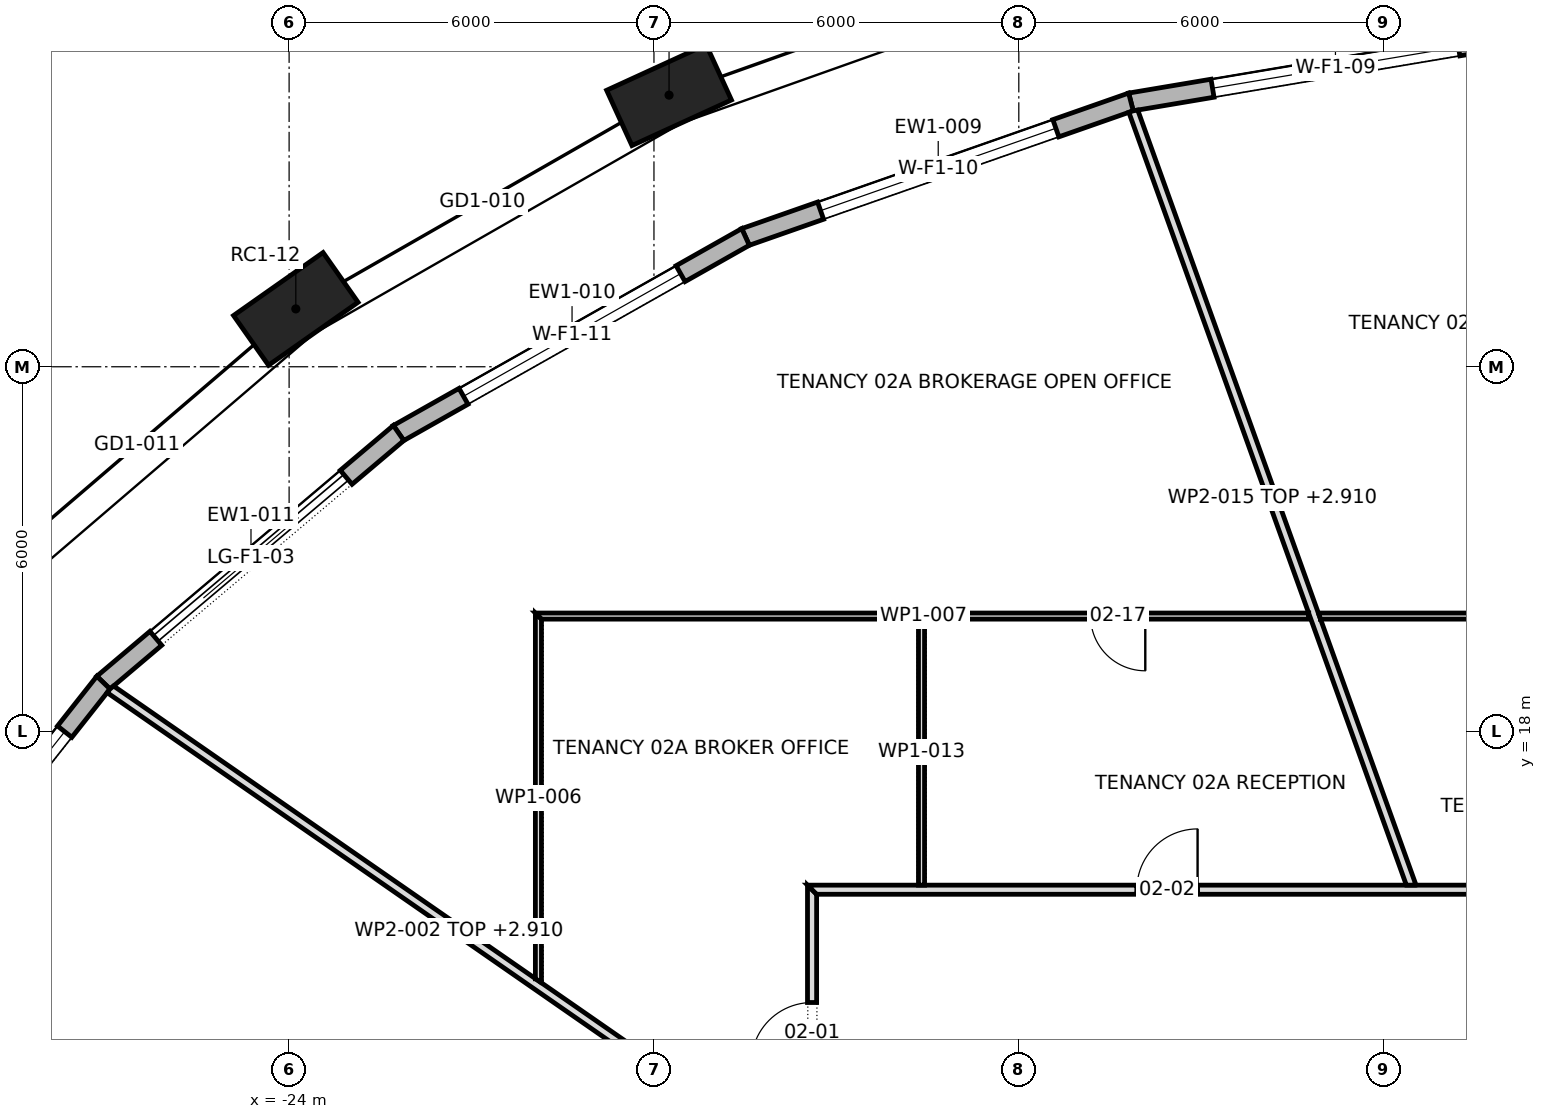
"""IFC4 building model, lengths in metres.
Left out: names, types, materials, properties, quantities, classifications, styles, units other than length and angle.
Written with IfcOpenShell. Run it as: python <this file> out.ifc"""

import sys

from ifc_helpers import new_model, si_unit, direction, frame, frame_2d, origin, origin_2d, place, context, subcontext, project, spatial, polyline, rectangle, outline, extrude, element, fill, save


model = new_model("IFC4")
c1 = context("Model", 3, precision=1e-05, world=origin(), true_north=direction((0.0, 1.0)))
c2 = subcontext(c1, "Body", "Model", "MODEL_VIEW")
j1 = project(units=[si_unit("LENGTHUNIT", "METRE"), si_unit("PLANEANGLEUNIT", "RADIAN")], contexts=[c1])
p1 = place(None, origin())
s1 = spatial("IfcSite", under=j1, at=p1, CompositionType="ELEMENT")
p2 = place(p1, origin())
s2 = spatial("IfcBuilding", under=s1, at=p2, CompositionType="ELEMENT")
p3 = place(p2, frame((0.0, 0.0, 36.1)))
s3 = spatial("IfcBuildingStorey", under=s2, at=p3, CompositionType="ELEMENT", Elevation=36.1)
for number, where, z_axis, x_axis in (
    (1, (-17.752, 28.467, 0.0), (0.0, 0.0, 1.0), (-0.909, -0.417, 0.0)),
    (2, (-23.89, 24.951, 0.0), (0.0, 0.0, 1.0), (-0.818, -0.575, 0.0)),
):
    element("IfcColumn", number, at=place(p3, frame(where, z_axis=z_axis, x_axis=x_axis)), inside=s3, PredefinedType="COLUMN", context=c2, shape_type="SweptSolid", body=[
        extrude(rectangle(XDim=1.8, YDim=1.0, at=origin_2d()), origin(), (0.0, 0.0, 1.0), 4.2),
    ])
p4 = place(p3, frame((-3.429, 29.486, 0.0), z_axis=(0.0, 0.0, 1.0), x_axis=(-0.986145179906, -0.165884550659, 0.0)))
e3 = element("IfcWall", 3, at=p4, inside=s3, PredefinedType="STANDARD", context=c2, shape_type="SweptSolid", body=[
    extrude(outline(polyline([(-0.012, -0.15), (6.834, -0.15), (6.809, 0.15), (0.012, 0.15), (-0.012, -0.15)])), origin(), (0.0, 0.0, 1.0), 3.9),
])
p5 = place(p4, frame((1.361, 0.0, 0.6)))
e4 = element("IfcOpeningElement", 4, at=p5, cuts=e3, PredefinedType="OPENING", context=c2, shape_type="SweptSolid", body=[
    extrude(rectangle(XDim=4.1, YDim=2.85, at=frame_2d((2.05, 1.425))), frame((0.0, 0.162, 0.0), z_axis=(0.0, -1.0, 0.0), x_axis=(1.0, 0.0, 0.0)), (0.0, 0.0, 1.0), 0.324),
])
p6 = place(p3, frame((-10.156, 28.355, 0.0), z_axis=(0.0, 0.0, 1.0), x_axis=(-0.943778979427, -0.330577128657, 0.0)))
e5 = element("IfcWall", 5, at=p6, inside=s3, PredefinedType="STANDARD", context=c2, shape_type="SweptSolid", body=[
    extrude(outline(polyline([(-0.013, -0.15), (6.729, -0.15), (6.702, 0.15), (0.013, 0.15), (-0.013, -0.15)])), origin(), (0.0, 0.0, 1.0), 3.9),
])
p7 = place(p6, frame((1.308, 0.0, 0.6)))
e6 = element("IfcOpeningElement", 6, at=p7, cuts=e5, PredefinedType="OPENING", context=c2, shape_type="SweptSolid", body=[
    extrude(rectangle(XDim=4.1, YDim=2.85, at=frame_2d((2.05, 1.425))), frame((0.0, 0.162, 0.0), z_axis=(0.0, -1.0, 0.0), x_axis=(1.0, 0.0, 0.0)), (0.0, 0.0, 1.0), 0.324),
])
p8 = place(p3, frame((-16.494, 26.135, 0.0), z_axis=(0.0, 0.0, 1.0), x_axis=(-0.87061279013, -0.491968870623, 0.0)))
e7 = element("IfcWall", 7, at=p8, inside=s3, PredefinedType="STANDARD", context=c2, shape_type="SweptSolid", body=[
    extrude(outline(polyline([(-0.013, -0.15), (6.568, -0.15), (6.539, 0.15), (0.013, 0.15), (-0.013, -0.15)])), origin(), (0.0, 0.0, 1.0), 3.9),
])
p9 = place(p8, frame((1.227, 0.0, 0.6)))
e8 = element("IfcOpeningElement", 8, at=p9, cuts=e7, PredefinedType="OPENING", context=c2, shape_type="SweptSolid", body=[
    extrude(rectangle(XDim=4.1, YDim=2.85, at=frame_2d((2.05, 1.425))), frame((0.0, 0.162, 0.0), z_axis=(0.0, -1.0, 0.0), x_axis=(1.0, 0.0, 0.0)), (0.0, 0.0, 1.0), 0.324),
])
p10 = place(p3, frame((-22.2, 22.911, 0.0), z_axis=(0.0, 0.0, 1.0), x_axis=(-0.763577077796, -0.645716691951, 0.0)))
e9 = element("IfcWall", 9, at=p10, inside=s3, PredefinedType="STANDARD", context=c2, shape_type="SweptSolid", body=[
    extrude(outline(polyline([(-0.014, -0.15), (6.372, -0.15), (6.342, 0.15), (0.014, 0.15), (-0.014, -0.15)])), origin(), (0.0, 0.0, 1.0), 3.9),
])
p11 = place(p10, frame((1.129, 0.0, 0.0)))
e10 = element("IfcOpeningElement", 10, at=p11, cuts=e9, PredefinedType="OPENING", context=c2, shape_type="SweptSolid", body=[
    extrude(rectangle(XDim=4.1, YDim=3.45, at=frame_2d((2.05, 1.725))), frame((0.0, 0.162, 0.0), z_axis=(0.0, -1.0, 0.0), x_axis=(1.0, 0.0, 0.0)), (0.0, 0.0, 1.0), 0.324),
])
p12 = place(p3, frame((-27.054, 18.806, 0.0), z_axis=(0.0, 0.0, 1.0), x_axis=(-0.61992334328, -0.784662378642, 0.0)))
e11 = element("IfcWall", 11, at=p12, inside=s3, PredefinedType="STANDARD", context=c2, shape_type="SweptSolid", body=[
    extrude(outline(polyline([(-0.015, -0.15), (6.171, -0.15), (6.139, 0.15), (0.015, 0.15), (-0.015, -0.15)])), origin(), (0.0, 0.0, 1.0), 3.9),
])
p13 = place(p12, frame((1.027, 0.0, 0.6)))
e12 = element("IfcOpeningElement", 12, at=p13, cuts=e11, PredefinedType="OPENING", context=c2, shape_type="SweptSolid", body=[
    extrude(rectangle(XDim=4.1, YDim=2.85, at=frame_2d((2.05, 1.425))), frame((0.0, 0.162, 0.0), z_axis=(0.0, -1.0, 0.0), x_axis=(1.0, 0.0, 0.0)), (0.0, 0.0, 1.0), 0.324),
])
p14 = place(p3, frame((-26.949, 18.703, 0.0), z_axis=(0.0, 0.0, 1.0), x_axis=(0.821614916445, -0.570042918626, 0.0)))
e13 = element("IfcWall", 13, at=p14, inside=s3, PredefinedType="PARTITIONING", context=c2, shape_type="SweptSolid", body=[
    extrude(outline(polyline([(14.017, -0.075), (14.017, -0.074), (13.967, -0.002), (13.967, -0.002), (13.914, 0.075), (12.1, 0.075), (10.286, 0.075), (8.472, 0.075), (8.469, 0.073), (8.467, 0.075), (6.779, 0.075), (5.09, 0.075), (3.402, 0.075), (1.713, 0.075), (0.024, 0.075), (0.004, 0.0), (0.0, -0.071), (0.0, -0.075), (1.752, -0.075), (3.504, -0.075), (5.257, -0.075), (7.009, -0.075), (8.761, -0.075), (10.513, -0.075), (12.265, -0.075), (14.017, -0.075)])), origin(), (0.0, 0.0, 1.0), 2.91),
])
p15 = place(p3, frame((-19.9, 13.869, 0.0), z_axis=(0.0, 0.0, 1.0), x_axis=(0.0, 1.0, 0.0)))
e14 = element("IfcWall", 14, at=p15, inside=s3, PredefinedType="PARTITIONING", context=c2, shape_type="SweptSolid", body=[
    extrude(outline(polyline([(0.0, -0.05), (1.994, -0.05), (3.987, -0.05), (5.981, -0.05), (5.981, -0.05), (6.081, 0.05), (4.578, 0.05), (3.075, 0.05), (1.572, 0.05), (0.069, 0.05), (0.0, -0.05), (0.0, -0.05)])), origin(), (0.0, 0.0, 1.0), 3.9),
])
p16 = place(p3, frame((-19.95, 19.9, 0.0), z_axis=(0.0, 0.0, 1.0), x_axis=(1.0, 0.0, 0.0)))
e15 = element("IfcWall", 15, at=p16, inside=s3, PredefinedType="PARTITIONING", context=c2, shape_type="SweptSolid", body=[
    extrude(outline(polyline([(12.718, 0.05), (10.901, 0.05), (9.084, 0.05), (7.267, 0.05), (5.45, 0.05), (3.634, 0.05), (1.817, 0.05), (0.0, 0.05), (0.1, -0.05), (1.903, -0.05), (3.705, -0.05), (5.508, -0.05), (7.31, -0.05), (9.113, -0.05), (10.915, -0.05), (12.718, -0.05), (12.718, 0.05)])), origin(), (0.0, 0.0, 1.0), 3.9),
])
p17 = place(p16, frame((9.13, 0.0, 0.0)))
e16 = element("IfcOpeningElement", 16, at=p17, cuts=e15, PredefinedType="OPENING", context=c2, shape_type="SweptSolid", body=[
    extrude(rectangle(XDim=0.9, YDim=2.1, at=frame_2d((0.45, 1.05))), frame((0.0, 0.062, 0.0), z_axis=(0.0, -1.0, 0.0), x_axis=(1.0, 0.0, 0.0)), (0.0, 0.0, 1.0), 0.124),
])
p18 = place(p3, frame((-15.4, -15.475, 0.0), z_axis=(0.0, 0.0, 1.0), x_axis=(0.0, 1.0, 0.0)))
e17 = element("IfcWall", 17, at=p18, inside=s3, PredefinedType="PARTITIONING", context=c2, shape_type="SweptSolid", body=[
    extrude(outline(polyline([(0.15, -0.075), (2.066, -0.075), (3.981, -0.075), (5.897, -0.075), (7.812, -0.075), (9.728, -0.075), (11.644, -0.075), (13.56, -0.075), (15.475, -0.075), (17.391, -0.075), (19.306, -0.075), (21.222, -0.075), (23.138, -0.075), (25.053, -0.075), (26.969, -0.075), (28.885, -0.075), (30.8, -0.075), (30.95, 0.075), (29.016, 0.075), (27.081, 0.075), (25.147, 0.075), (23.212, 0.075), (21.278, 0.075), (19.344, 0.075), (17.409, 0.075), (15.475, 0.075), (13.541, 0.075), (11.606, 0.075), (9.672, 0.075), (7.738, 0.075), (5.803, 0.075), (3.869, 0.075), (1.935, 0.075), (0.0, 0.075), (0.15, -0.075)])), origin(), (0.0, 0.0, 1.0), 3.9),
])
p19 = place(p18, frame((28.02, 0.0, 0.0)))
e18 = element("IfcOpeningElement", 18, at=p19, cuts=e17, PredefinedType="OPENING", context=c2, shape_type="SweptSolid", body=[
    extrude(rectangle(XDim=1.0, YDim=2.1, at=frame_2d((0.5, 1.05))), frame((0.0, 0.087, 0.0), z_axis=(0.0, -1.0, 0.0), x_axis=(1.0, 0.0, 0.0)), (0.0, 0.0, 1.0), 0.174),
])
p20 = place(p18, frame((21.895, 0.0, 0.0)))
e19 = element("IfcOpeningElement", 19, at=p20, cuts=e17, PredefinedType="OPENING", context=c2, shape_type="SweptSolid", body=[
    extrude(rectangle(XDim=1.8, YDim=2.1, at=frame_2d((0.9, 1.05))), frame((0.0, 0.087, 0.0), z_axis=(0.0, -1.0, 0.0), x_axis=(1.0, 0.0, 0.0)), (0.0, 0.0, 1.0), 0.174),
])
p21 = place(p18, frame((15.798, 0.0, 0.0)))
e20 = element("IfcOpeningElement", 20, at=p21, cuts=e17, PredefinedType="OPENING", context=c2, shape_type="SweptSolid", body=[
    extrude(rectangle(XDim=1.8, YDim=2.1, at=frame_2d((0.9, 1.05))), frame((0.0, 0.087, 0.0), z_axis=(0.0, -1.0, 0.0), x_axis=(1.0, 0.0, 0.0)), (0.0, 0.0, 1.0), 0.174),
])
p22 = place(p18, frame((10.343, 0.0, 0.0)))
e21 = element("IfcOpeningElement", 21, at=p22, cuts=e17, PredefinedType="OPENING", context=c2, shape_type="SweptSolid", body=[
    extrude(rectangle(XDim=1.8, YDim=2.1, at=frame_2d((0.9, 1.05))), frame((0.0, 0.087, 0.0), z_axis=(0.0, -1.0, 0.0), x_axis=(1.0, 0.0, 0.0)), (0.0, 0.0, 1.0), 0.174),
])
p23 = place(p18, frame((3.795, 0.0, 0.0)))
e22 = element("IfcOpeningElement", 22, at=p23, cuts=e17, PredefinedType="OPENING", context=c2, shape_type="SweptSolid", body=[
    extrude(rectangle(XDim=1.0, YDim=2.1, at=frame_2d((0.5, 1.05))), frame((0.0, 0.087, 0.0), z_axis=(0.0, -1.0, 0.0), x_axis=(1.0, 0.0, 0.0)), (0.0, 0.0, 1.0), 0.174),
])
p24 = place(p3, frame((-15.475, 15.4, 0.0), z_axis=(0.0, 0.0, 1.0), x_axis=(1.0, 0.0, 0.0)))
e23 = element("IfcWall", 23, at=p24, inside=s3, PredefinedType="PARTITIONING", context=c2, shape_type="SweptSolid", body=[
    extrude(outline(polyline([(0.15, -0.075), (2.066, -0.075), (3.981, -0.075), (5.897, -0.075), (7.812, -0.075), (9.728, -0.075), (11.644, -0.075), (13.56, -0.075), (15.475, -0.075), (17.391, -0.075), (19.306, -0.075), (21.222, -0.075), (23.138, -0.075), (25.053, -0.075), (26.969, -0.075), (28.885, -0.075), (30.8, -0.075), (30.95, 0.075), (29.016, 0.075), (27.081, 0.075), (25.147, 0.075), (23.212, 0.075), (21.278, 0.075), (19.344, 0.075), (17.409, 0.075), (15.475, 0.075), (13.541, 0.075), (11.606, 0.075), (9.672, 0.075), (7.738, 0.075), (5.803, 0.075), (3.869, 0.075), (1.935, 0.075), (0.0, 0.075), (0.15, -0.075)])), origin(), (0.0, 0.0, 1.0), 3.9),
])
p25 = place(p24, frame((5.415, 0.0, 0.0)))
e24 = element("IfcOpeningElement", 24, at=p25, cuts=e23, PredefinedType="OPENING", context=c2, shape_type="SweptSolid", body=[
    extrude(rectangle(XDim=1.0, YDim=2.1, at=frame_2d((0.5, 1.05))), frame((0.0, 0.087, 0.0), z_axis=(0.0, -1.0, 0.0), x_axis=(1.0, 0.0, 0.0)), (0.0, 0.0, 1.0), 0.174),
])
p26 = place(p24, frame((25.435, 0.0, 0.0)))
e25 = element("IfcOpeningElement", 25, at=p26, cuts=e23, PredefinedType="OPENING", context=c2, shape_type="SweptSolid", body=[
    extrude(rectangle(XDim=1.0, YDim=2.1, at=frame_2d((0.5, 1.05))), frame((0.0, 0.087, 0.0), z_axis=(0.0, -1.0, 0.0), x_axis=(1.0, 0.0, 0.0)), (0.0, 0.0, 1.0), 0.174),
])
p27 = place(p24, frame((14.975, 0.0, 0.0)))
e26 = element("IfcOpeningElement", 26, at=p27, cuts=e23, PredefinedType="OPENING", context=c2, shape_type="SweptSolid", body=[
    extrude(rectangle(XDim=1.0, YDim=2.1, at=frame_2d((0.5, 1.05))), frame((0.0, 0.087, 0.0), z_axis=(0.0, -1.0, 0.0), x_axis=(1.0, 0.0, 0.0)), (0.0, 0.0, 1.0), 0.174),
])
p28 = place(p3, frame((-13.6, 19.85, 0.0), z_axis=(0.0, 0.0, 1.0), x_axis=(0.0, -1.0, 0.0)))
e27 = element("IfcWall", 27, at=p28, inside=s3, PredefinedType="PARTITIONING", context=c2, shape_type="SweptSolid", body=[
    extrude(rectangle(XDim=4.375, YDim=0.1, at=frame_2d((2.188, 0.0))), origin(), (0.0, 0.0, 1.0), 3.9),
])
p29 = place(p3, frame((-10.119, 28.209, 0.0), z_axis=(0.0, 0.0, 1.0), x_axis=(0.337949016046, -0.941164418448, 0.0)))
e28 = element("IfcWall", 28, at=p29, inside=s3, PredefinedType="PARTITIONING", context=c2, shape_type="SweptSolid", body=[
    extrude(outline(polyline([(0.0, -0.075), (1.75, -0.075), (3.5, -0.075), (5.249, -0.075), (6.999, -0.075), (8.749, -0.075), (8.749, -0.074), (8.751, -0.075), (10.335, -0.075), (11.919, -0.075), (13.503, -0.075), (13.555, 0.069), (13.555, 0.069), (13.557, 0.074), (13.557, 0.075), (12.008, 0.075), (10.458, 0.075), (8.909, 0.075), (8.908, 0.073), (8.903, 0.075), (7.125, 0.075), (5.347, 0.075), (3.57, 0.075), (1.792, 0.075), (0.014, 0.075), (0.0, 0.0), (0.0, -0.071), (0.0, -0.075)])), origin(), (0.0, 0.0, 1.0), 2.91),
])
p30 = place(p3, frame((-7.074, 19.9, 0.0), z_axis=(0.0, 0.0, 1.0), x_axis=(1.0, 0.0, 0.0)))
e29 = element("IfcWall", 29, at=p30, inside=s3, PredefinedType="PARTITIONING", context=c2, shape_type="SweptSolid", body=[
    extrude(outline(polyline([(0.036, -0.05), (1.795, -0.05), (3.555, -0.05), (5.314, -0.05), (7.074, -0.05), (8.833, -0.05), (10.593, -0.05), (12.353, -0.05), (14.112, -0.05), (14.148, 0.05), (14.148, 0.05), (12.379, 0.05), (10.611, 0.05), (8.843, 0.05), (7.074, 0.05), (5.305, 0.05), (3.537, 0.05), (1.769, 0.05), (0.0, 0.05), (0.0, 0.05), (0.036, -0.05)])), origin(), (0.0, 0.0, 1.0), 3.9),
])
p31 = place(p30, frame((6.624, 0.0, 0.0)))
e30 = element("IfcOpeningElement", 30, at=p31, cuts=e29, PredefinedType="OPENING", context=c2, shape_type="SweptSolid", body=[
    extrude(rectangle(XDim=0.9, YDim=2.1, at=frame_2d((0.45, 1.05))), frame((0.0, 0.062, 0.0), z_axis=(0.0, -1.0, 0.0), x_axis=(1.0, 0.0, 0.0)), (0.0, 0.0, 1.0), 0.124),
])
p32 = place(p5, origin())
e31 = element("IfcWindow", 31, at=p32, inside=s3, PartitioningType="TRIPLE_PANEL_VERTICAL", PredefinedType="WINDOW", context=c2, shape_type="SweptSolid", body=[
    extrude(rectangle(XDim=4.1, YDim=2.85, at=frame_2d((2.05, 1.425))), frame((0.0, 0.03, 0.0), z_axis=(0.0, -1.0, 0.0), x_axis=(1.0, 0.0, 0.0)), (0.0, 0.0, 1.0), 0.06),
])
fill(e4, e31)
p33 = place(p7, origin())
e32 = element("IfcWindow", 32, at=p33, inside=s3, PartitioningType="TRIPLE_PANEL_VERTICAL", PredefinedType="WINDOW", context=c2, shape_type="SweptSolid", body=[
    extrude(rectangle(XDim=4.1, YDim=2.85, at=frame_2d((2.05, 1.425))), frame((0.0, 0.03, 0.0), z_axis=(0.0, -1.0, 0.0), x_axis=(1.0, 0.0, 0.0)), (0.0, 0.0, 1.0), 0.06),
])
fill(e6, e32)
p34 = place(p9, origin())
e33 = element("IfcWindow", 33, at=p34, inside=s3, PartitioningType="TRIPLE_PANEL_VERTICAL", PredefinedType="WINDOW", context=c2, shape_type="SweptSolid", body=[
    extrude(rectangle(XDim=4.1, YDim=2.85, at=frame_2d((2.05, 1.425))), frame((0.0, 0.03, 0.0), z_axis=(0.0, -1.0, 0.0), x_axis=(1.0, 0.0, 0.0)), (0.0, 0.0, 1.0), 0.06),
])
fill(e8, e33)
p35 = place(p11, origin())
e34 = element("IfcDoor", 34, at=p35, inside=s3, OperationType="DOUBLE_DOOR_SLIDING", PredefinedType="DOOR", context=c2, shape_type="SweptSolid", body=[
    extrude(rectangle(XDim=4.1, YDim=3.45, at=frame_2d((2.05, 1.725))), frame((0.0, 0.025, 0.0), z_axis=(0.0, -1.0, 0.0), x_axis=(1.0, 0.0, 0.0)), (0.0, 0.0, 1.0), 0.05),
])
fill(e10, e34)
p36 = place(p13, origin())
e35 = element("IfcWindow", 35, at=p36, inside=s3, PartitioningType="TRIPLE_PANEL_VERTICAL", PredefinedType="WINDOW", context=c2, shape_type="SweptSolid", body=[
    extrude(rectangle(XDim=4.1, YDim=2.85, at=frame_2d((2.05, 1.425))), frame((0.0, 0.03, 0.0), z_axis=(0.0, -1.0, 0.0), x_axis=(1.0, 0.0, 0.0)), (0.0, 0.0, 1.0), 0.06),
])
fill(e12, e35)
p37 = place(p19, origin())
e36 = element("IfcDoor", 36, at=p37, inside=s3, OperationType="SINGLE_SWING_RIGHT", PredefinedType="DOOR", context=c2, shape_type="SweptSolid", body=[
    extrude(rectangle(XDim=1.0, YDim=2.1, at=frame_2d((0.5, 1.05))), frame((0.0, 0.025, 0.0), z_axis=(0.0, -1.0, 0.0), x_axis=(1.0, 0.0, 0.0)), (0.0, 0.0, 1.0), 0.05),
])
fill(e18, e36)
p38 = place(p25, origin())
e37 = element("IfcDoor", 37, at=p38, inside=s3, OperationType="SINGLE_SWING_LEFT", PredefinedType="DOOR", context=c2, shape_type="SweptSolid", body=[
    extrude(rectangle(XDim=1.0, YDim=2.1, at=frame_2d((0.5, 1.05))), frame((0.0, 0.025, 0.0), z_axis=(0.0, -1.0, 0.0), x_axis=(1.0, 0.0, 0.0)), (0.0, 0.0, 1.0), 0.05),
])
fill(e24, e37)
p39 = place(p17, frame((0.9, 0.0, 0.0), z_axis=(0.0, 0.0, 1.0), x_axis=(-1.0, 0.0, 0.0)))
e38 = element("IfcDoor", 38, at=p39, inside=s3, OperationType="SINGLE_SWING_RIGHT", PredefinedType="DOOR", context=c2, shape_type="SweptSolid", body=[
    extrude(rectangle(XDim=0.9, YDim=2.1, at=frame_2d((0.45, 1.05))), frame((0.0, 0.025, 0.0), z_axis=(0.0, -1.0, 0.0), x_axis=(1.0, 0.0, 0.0)), (0.0, 0.0, 1.0), 0.05),
])
fill(e16, e38)
save(model, sys.argv[1])
